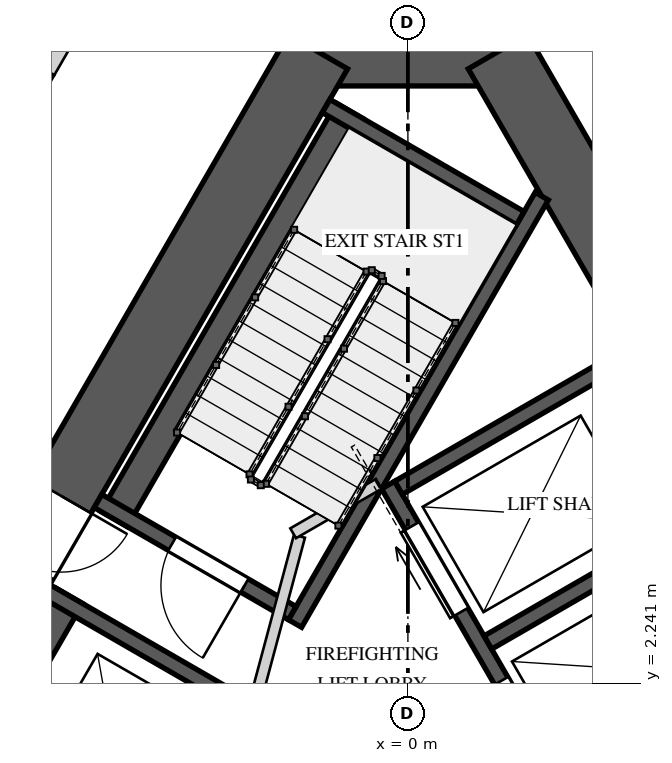
"""IFC4 building model, lengths in metres.
Left out: names, types, materials, properties, quantities, classifications, styles, units other than length and angle.
Written with IfcOpenShell. Run it as: python <this file> out.ifc"""

import sys

from ifc_helpers import new_model, si_unit, direction, frame, frame_2d, origin, place, context, subcontext, project, spatial, rectangle, extrude, element, fill, save


model = new_model("IFC4")
c1 = context("Model", 3, precision=1e-05, world=origin(), true_north=direction((0.0, 1.0)))
c2 = subcontext(c1, "Body", "Model", "MODEL_VIEW")
j1 = project(units=[si_unit("LENGTHUNIT", "METRE"), si_unit("PLANEANGLEUNIT", "RADIAN")], contexts=[c1])
p1 = place(None, origin())
s1 = spatial("IfcSite", under=j1, at=p1, CompositionType="ELEMENT")
p2 = place(p1, origin())
s2 = spatial("IfcBuilding", under=s1, at=p2, CompositionType="ELEMENT")
p3 = place(p2, frame((0.0, 0.0, 129.6)))
s3 = spatial("IfcBuildingStorey", under=s2, at=p3, CompositionType="ELEMENT", Elevation=129.6)
p4 = place(p3, frame((1.443, 10.55, 0.0), z_axis=(0.0, 0.0, 1.0), x_axis=(-1.0, 0.0, 0.0)))
e1 = element("IfcWall", 1, at=p4, inside=s3, PredefinedType="SHEAR", context=c2, shape_type="SweptSolid", body=[
    extrude(rectangle(XDim=2.887, YDim=0.9, at=frame_2d((1.443, 0.0))), origin(), (0.0, 0.0, 1.0), 4.0),
])
p5 = place(p3, frame((-1.184, 10.55, 0.0), z_axis=(0.0, 0.0, 1.0), x_axis=(-0.500004814304, -0.866022624227, 0.0)))
e2 = element("IfcWall", 2, at=p5, inside=s3, PredefinedType="SHEAR", context=c2, shape_type="SweptSolid", body=[
    extrude(rectangle(XDim=17.09, YDim=0.9, at=frame_2d((8.545, 0.0))), origin(), (0.0, 0.0, 1.0), 4.0),
])
p6 = place(p5, frame((6.75, 0.0, 0.0)))
e3 = element("IfcOpeningElement", 3, at=p6, cuts=e2, PredefinedType="OPENING", context=c2, shape_type="SweptSolid", body=[
    extrude(rectangle(XDim=1.0, YDim=2.4, at=frame_2d((0.5, 1.2))), frame((0.0, 0.46, 0.0), z_axis=(0.0, -1.0, 0.0), x_axis=(1.0, 0.0, 0.0)), (0.0, 0.0, 1.0), 0.92),
])
p7 = place(p5, frame((14.678, 0.0, 0.0)))
e4 = element("IfcOpeningElement", 4, at=p7, cuts=e2, PredefinedType="OPENING", context=c2, shape_type="SweptSolid", body=[
    extrude(rectangle(XDim=0.8, YDim=2.1, at=frame_2d((0.4, 1.05))), frame((0.0, 0.46, 0.0), z_axis=(0.0, -1.0, 0.0), x_axis=(1.0, 0.0, 0.0)), (0.0, 0.0, 1.0), 0.92),
])
p8 = place(p3, frame((9.729, -4.25, 0.0), z_axis=(0.0, 0.0, 1.0), x_axis=(-0.500004814304, 0.866022624227, 0.0)))
e5 = element("IfcWall", 5, at=p8, inside=s3, PredefinedType="SHEAR", context=c2, shape_type="SweptSolid", body=[
    extrude(rectangle(XDim=17.09, YDim=0.9, at=frame_2d((8.545, 0.0))), origin(), (0.0, 0.0, 1.0), 4.0),
])
p9 = place(p8, frame((6.82, 0.0, 0.0)))
e6 = element("IfcOpeningElement", 6, at=p9, cuts=e5, PredefinedType="OPENING", context=c2, shape_type="SweptSolid", body=[
    extrude(rectangle(XDim=1.0, YDim=2.4, at=frame_2d((0.5, 1.2))), frame((0.0, 0.46, 0.0), z_axis=(0.0, -1.0, 0.0), x_axis=(1.0, 0.0, 0.0)), (0.0, 0.0, 1.0), 0.92),
])
p10 = place(p3, frame((-0.766, 9.772, 0.0), z_axis=(0.0, 0.0, 1.0), x_axis=(-0.500009909098, -0.866019682689, 0.0)))
e7 = element("IfcWall", 7, at=p10, inside=s3, PredefinedType="SOLIDWALL", context=c2, shape_type="SweptSolid", body=[
    extrude(rectangle(XDim=6.2, YDim=0.4, at=frame_2d((3.1, 0.0))), origin(), (0.0, 0.0, 1.0), 3.65),
])
p11 = place(p3, frame((1.761, 8.65, 0.0), z_axis=(0.0, 0.0, 1.0), x_axis=(-0.500010023241, -0.866019616786, 0.0)))
e8 = element("IfcWall", 8, at=p11, inside=s3, PredefinedType="SOLIDWALL", context=c2, shape_type="SweptSolid", body=[
    extrude(rectangle(XDim=6.491, YDim=0.2, at=frame_2d((3.246, 0.0))), origin(), (0.0, 0.0, 1.0), 3.65),
])
p12 = place(p3, frame((1.479, 8.361, 0.0), z_axis=(0.0, 0.0, 1.0), x_axis=(-0.866003658127, 0.500037662692, 0.0)))
e9 = element("IfcWall", 9, at=p12, inside=s3, PredefinedType="SOLIDWALL", context=c2, shape_type="SweptSolid", body=[
    extrude(rectangle(XDim=2.95, YDim=0.2, at=frame_2d((1.475, 0.0))), origin(), (0.0, 0.0, 1.0), 3.65),
])
p13 = place(p3, frame((-1.521, 3.165, 0.0), z_axis=(0.0, 0.0, 1.0), x_axis=(-0.866039495442, 0.49997559174, 0.0)))
e10 = element("IfcWall", 10, at=p13, inside=s3, PredefinedType="SOLIDWALL", context=c2, shape_type="SweptSolid", body=[
    extrude(rectangle(XDim=2.95, YDim=0.2, at=frame_2d((1.475, 0.0))), origin(), (0.0, 0.0, 1.0), 3.65),
])
p14 = place(p13, frame((0.725, 0.0, 0.0)))
e11 = element("IfcOpeningElement", 11, at=p14, cuts=e10, PredefinedType="OPENING", context=c2, shape_type="SweptSolid", body=[
    extrude(rectangle(XDim=1.1, YDim=2.4, at=frame_2d((0.55, 1.2))), frame((0.0, 0.11, 0.0), z_axis=(0.0, -1.0, 0.0), x_axis=(1.0, 0.0, 0.0)), (0.0, 0.0, 1.0), 0.22),
])
p15 = place(p3, frame((-4.451, 3.39, 0.0), z_axis=(0.0, 0.0, 1.0), x_axis=(-0.499996545922, -0.866027397988, 0.0)))
e12 = element("IfcWall", 12, at=p15, inside=s3, PredefinedType="SOLIDWALL", context=c2, shape_type="SweptSolid", body=[
    extrude(rectangle(XDim=5.5, YDim=0.4, at=frame_2d((2.75, 0.0))), origin(), (0.0, 0.0, 1.0), 3.65),
])
p16 = place(p3, frame((-2.38, 2.078, 0.0), z_axis=(0.0, 0.0, 1.0), x_axis=(-0.866027397988, 0.499996545922, 0.0)))
e13 = element("IfcWall", 13, at=p16, inside=s3, PredefinedType="SOLIDWALL", context=c2, shape_type="SweptSolid", body=[
    extrude(rectangle(XDim=2.75, YDim=0.2, at=frame_2d((1.375, 0.0))), origin(), (0.0, 0.0, 1.0), 3.65),
])
p17 = place(p3, frame((2.19, 0.606, 0.0), z_axis=(0.0, 0.0, 1.0), x_axis=(-0.500002801628, 0.866023786258, 0.0)))
e14 = element("IfcWall", 14, at=p17, inside=s3, PredefinedType="SOLIDWALL", context=c2, shape_type="SweptSolid", body=[
    extrude(rectangle(XDim=4.9, YDim=0.2, at=frame_2d((2.45, 0.0))), origin(), (0.0, 0.0, 1.0), 3.65),
])
p18 = place(p17, frame((0.625, 0.0, 0.0)))
e15 = element("IfcOpeningElement", 15, at=p18, cuts=e14, PredefinedType="OPENING", context=c2, shape_type="SweptSolid", body=[
    extrude(rectangle(XDim=1.3, YDim=2.1, at=frame_2d((0.65, 1.05))), frame((0.0, 0.11, 0.0), z_axis=(0.0, -1.0, 0.0), x_axis=(1.0, 0.0, 0.0)), (0.0, 0.0, 1.0), 0.22),
])
p19 = place(p17, frame((2.975, 0.0, 0.0)))
e16 = element("IfcOpeningElement", 16, at=p19, cuts=e14, PredefinedType="OPENING", context=c2, shape_type="SweptSolid", body=[
    extrude(rectangle(XDim=1.3, YDim=2.1, at=frame_2d((0.65, 1.05))), frame((0.0, 0.11, 0.0), z_axis=(0.0, -1.0, 0.0), x_axis=(1.0, 0.0, 0.0)), (0.0, 0.0, 1.0), 0.22),
])
for number, where, z_axis, x_axis in (
    (17, (2.227, 0.743, 0.0), (0.0, 0.0, 1.0), (0.866, 0.5, 0.0)),
    (18, (1.052, 2.778, 0.0), (0.0, 0.0, 1.0), (0.866, 0.5, 0.0)),
):
    element("IfcWall", number, at=place(p3, frame(where, z_axis=z_axis, x_axis=x_axis)), inside=s3, PredefinedType="SOLIDWALL", context=c2, shape_type="SweptSolid", body=[
        extrude(rectangle(XDim=3.55, YDim=0.2, at=frame_2d((1.775, 0.0))), origin(), (0.0, 0.0, 1.0), 3.65),
    ])
p20 = place(p3, frame((-0.123, 4.813, 0.0), z_axis=(0.0, 0.0, 1.0), x_axis=(0.865995461329, 0.500051858269, 0.0)))
e19 = element("IfcWall", 19, at=p20, inside=s3, PredefinedType="SOLIDWALL", context=c2, shape_type="SweptSolid", body=[
    extrude(rectangle(XDim=3.55, YDim=0.2, at=frame_2d((1.775, 0.0))), origin(), (0.0, 0.0, 1.0), 3.65),
])
p21 = place(p3, frame((-2.178, 1.372, 0.0), z_axis=(0.0, 0.0, 1.0), x_axis=(0.258808958833, 0.96592852884, 0.0)))
e20 = element("IfcWall", 20, at=p21, inside=s3, PredefinedType="PARTITIONING", context=c2, shape_type="SweptSolid", body=[
    extrude(rectangle(XDim=2.903, YDim=0.15, at=frame_2d((1.451, 0.0))), origin(), (0.0, 0.0, 1.0), 3.65),
])
p22 = place(p3, frame((-1.51, 4.215, 0.0), z_axis=(0.0, 0.0, 1.0), x_axis=(0.866085525409, 0.49989585183, 0.0)))
e21 = element("IfcWall", 21, at=p22, inside=s3, PredefinedType="PARTITIONING", context=c2, shape_type="SweptSolid", body=[
    extrude(rectangle(XDim=1.3, YDim=0.15, at=frame_2d((0.65, 0.0))), origin(), (0.0, 0.0, 1.0), 3.65),
])
p23 = place(p3, frame((-5.25, 9.407, 0.0), z_axis=(0.0, 0.0, 1.0), x_axis=(0.499991148707, 0.866030514021, 0.0)))
e22 = element("IfcWall", 22, at=p23, inside=s3, PredefinedType="SOLIDWALL", context=c2, shape_type="SweptSolid", body=[
    extrude(rectangle(XDim=1.022, YDim=0.2, at=frame_2d((0.511, 0.0))), origin(), (0.0, 0.0, 1.0), 3.65),
])
p24 = place(p3, frame((-4.738, 10.293, 0.0), z_axis=(0.0, 0.0, 1.0), x_axis=(0.500001688065, 0.866024429177, 0.0)))
e23 = element("IfcWall", 23, at=p24, inside=s3, PredefinedType="SOLIDWALL", context=c2, shape_type="SweptSolid", body=[
    extrude(rectangle(XDim=1.135, YDim=0.2, at=frame_2d((0.568, 0.0))), origin(), (0.0, 0.0, 1.0), 2.55),
])
p25 = place(p14, origin())
e24 = element("IfcDoor", 24, at=p25, inside=s3, OperationType="SINGLE_SWING_RIGHT", PredefinedType="DOOR", context=c2, shape_type="SweptSolid", body=[
    extrude(rectangle(XDim=1.1, YDim=2.4, at=frame_2d((0.55, 1.2))), frame((0.0, 0.025, 0.0), z_axis=(0.0, -1.0, 0.0), x_axis=(1.0, 0.0, 0.0)), (0.0, 0.0, 1.0), 0.05),
])
fill(e11, e24)
p26 = place(p18, origin())
e25 = element("IfcDoor", 25, at=p26, inside=s3, OperationType="SLIDING_TO_LEFT", PredefinedType="DOOR", context=c2, shape_type="SweptSolid", body=[
    extrude(rectangle(XDim=1.3, YDim=2.1, at=frame_2d((0.65, 1.05))), frame((0.0, 0.025, 0.0), z_axis=(0.0, -1.0, 0.0), x_axis=(1.0, 0.0, 0.0)), (0.0, 0.0, 1.0), 0.05),
])
fill(e15, e25)
p27 = place(p19, origin())
e26 = element("IfcDoor", 26, at=p27, inside=s3, OperationType="SLIDING_TO_RIGHT", PredefinedType="DOOR", context=c2, shape_type="SweptSolid", body=[
    extrude(rectangle(XDim=1.3, YDim=2.1, at=frame_2d((0.65, 1.05))), frame((0.0, 0.025, 0.0), z_axis=(0.0, -1.0, 0.0), x_axis=(1.0, 0.0, 0.0)), (0.0, 0.0, 1.0), 0.05),
])
fill(e16, e26)
p28 = place(p6, origin())
e27 = element("IfcDoor", 27, at=p28, inside=s3, OperationType="SINGLE_SWING_RIGHT", PredefinedType="DOOR", context=c2, shape_type="SweptSolid", body=[
    extrude(rectangle(XDim=1.0, YDim=2.4, at=frame_2d((0.5, 1.2))), frame((0.0, 0.025, 0.0), z_axis=(0.0, -1.0, 0.0), x_axis=(1.0, 0.0, 0.0)), (0.0, 0.0, 1.0), 0.05),
])
fill(e3, e27)
save(model, sys.argv[1])
